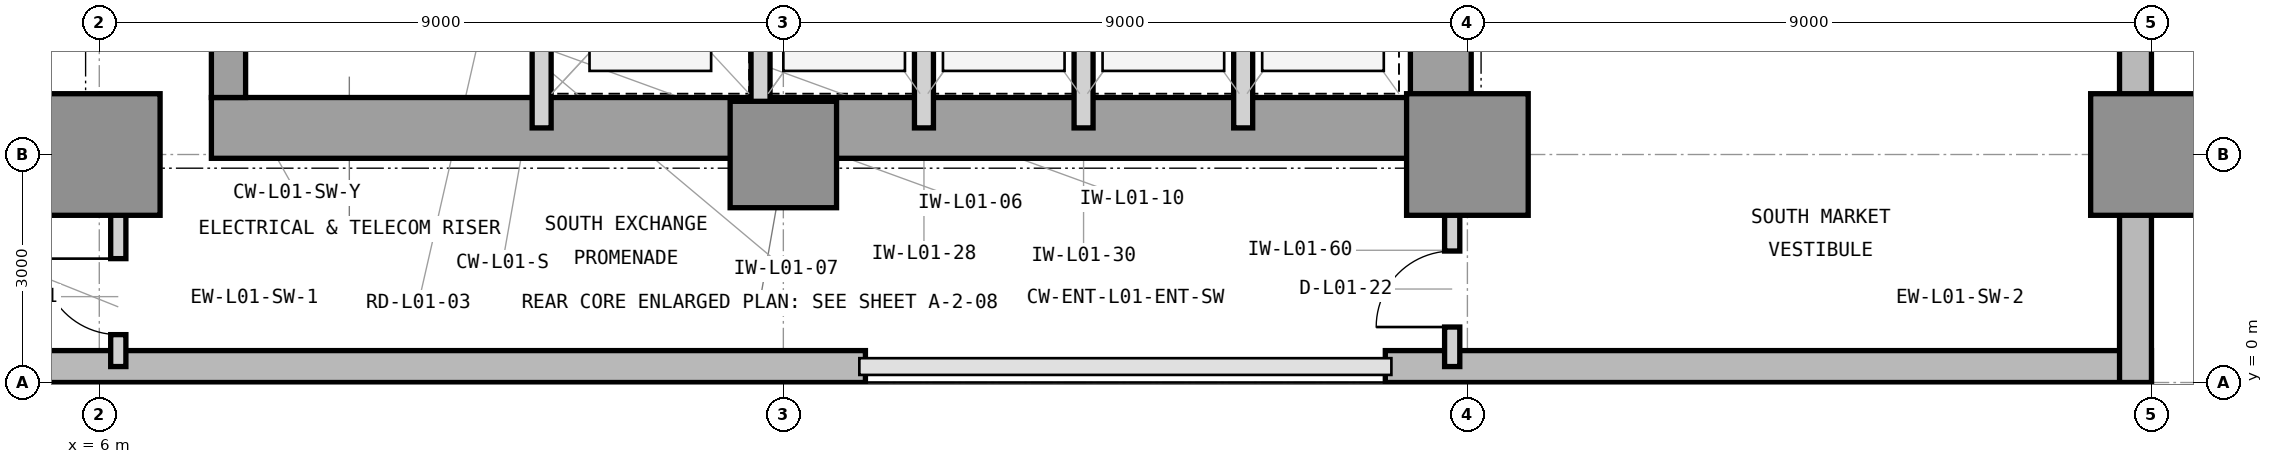
"""IFC4 building model, lengths in metres.
Left out: names, types, materials, properties, quantities, classifications, styles, units other than length and angle.
Written with IfcOpenShell. Run it as: python <this file> out.ifc"""

import sys

from ifc_helpers import new_model, si_unit, direction, frame, frame_2d, origin, origin_2d, place, context, subcontext, project, spatial, rectangle, extrude, element, fill, save


model = new_model("IFC4")
c1 = context("Model", 3, precision=1e-05, world=origin(), true_north=direction((0.0, 1.0)))
c2 = subcontext(c1, "Body", "Model", "MODEL_VIEW")
j1 = project(units=[si_unit("LENGTHUNIT", "METRE"), si_unit("PLANEANGLEUNIT", "RADIAN")], contexts=[c1])
p1 = place(None, origin())
s1 = spatial("IfcSite", under=j1, at=p1, CompositionType="ELEMENT")
p2 = place(p1, origin())
s2 = spatial("IfcBuilding", under=s1, at=p2, CompositionType="ELEMENT")
p3 = place(p2, frame((0.0, 0.0, 5.4)))
s3 = spatial("IfcBuildingStorey", under=s2, at=p3, CompositionType="ELEMENT", Elevation=5.4)
p4 = place(p3, frame((7.475, 3.35, 0.0), z_axis=(0.0, 0.0, 1.0), x_axis=(1.0, 0.0, 0.0)))
e1 = element("IfcWall", 1, at=p4, inside=s3, PredefinedType="SHEAR", context=c2, shape_type="SweptSolid", body=[
    extrude(rectangle(XDim=16.575, YDim=0.8, at=frame_2d((8.288, 0.0))), origin(), (0.0, 0.0, 1.0), 5.4),
])
p5 = place(p3, frame((23.65, 3.75, 0.0), z_axis=(0.0, 0.0, 1.0), x_axis=(0.0, 1.0, 0.0)))
e2 = element("IfcWall", 2, at=p5, inside=s3, PredefinedType="SHEAR", context=c2, shape_type="SweptSolid", body=[
    extrude(rectangle(XDim=3.05, YDim=0.8, at=frame_2d((1.525, 0.0))), origin(), (0.0, 0.0, 1.0), 5.4),
])
p6 = place(p3, frame((7.7, 3.75, 0.0), z_axis=(0.0, 0.0, 1.0), x_axis=(0.0, 1.0, 0.0)))
e3 = element("IfcWall", 3, at=p6, inside=s3, PredefinedType="SHEAR", context=c2, shape_type="SweptSolid", body=[
    extrude(rectangle(XDim=0.675, YDim=0.45, at=frame_2d((0.337, 0.0))), origin(), (0.0, 0.0, 1.0), 5.4),
])
p7 = place(p3, frame((6.0, 3.0, 0.0), z_axis=(0.0, 0.0, 1.0), x_axis=(1.0, 0.0, 0.0)))
e4 = element("IfcColumn", 4, at=p7, inside=s3, PredefinedType="COLUMN", context=c2, shape_type="SweptSolid", body=[
    extrude(rectangle(XDim=1.6, YDim=1.6, at=origin_2d()), origin(), (0.0, 0.0, 1.0), 5.4),
])
p8 = place(p3, frame((15.0, 3.0, 0.0), z_axis=(0.0, 0.0, 1.0), x_axis=(1.0, 0.0, 0.0)))
e5 = element("IfcColumn", 5, at=p8, inside=s3, PredefinedType="COLUMN", context=c2, shape_type="SweptSolid", body=[
    extrude(rectangle(XDim=1.4, YDim=1.4, at=origin_2d()), origin(), (0.0, 0.0, 1.0), 5.4),
])
for number, where, z_axis, x_axis in (
    (6, (24.0, 3.0, 0.0), (0.0, 0.0, 1.0), (1.0, 0.0, 0.0)),
    (7, (33.0, 3.0, 0.0), (0.0, 0.0, 1.0), (1.0, 0.0, 0.0)),
):
    element("IfcColumn", number, at=place(p3, frame(where, z_axis=z_axis, x_axis=x_axis)), inside=s3, PredefinedType="COLUMN", context=c2, shape_type="SweptSolid", body=[
        extrude(rectangle(XDim=1.6, YDim=1.6, at=origin_2d()), origin(), (0.0, 0.0, 1.0), 5.4),
    ])
p9 = place(p3, frame((0.0, 0.21, 0.0), z_axis=(0.0, 0.0, 1.0), x_axis=(1.0, 0.0, 0.0)))
e8 = element("IfcWall", 8, at=p9, inside=s3, PredefinedType="STANDARD", context=c2, shape_type="SweptSolid", body=[
    extrude(rectangle(XDim=16.08, YDim=0.42, at=frame_2d((8.04, 0.0))), origin(), (0.0, 0.0, 1.0), 5.1),
])
p10 = place(p3, frame((22.92, 0.21, 0.0), z_axis=(0.0, 0.0, 1.0), x_axis=(1.0, 0.0, 0.0)))
e9 = element("IfcWall", 9, at=p10, inside=s3, PredefinedType="STANDARD", context=c2, shape_type="SweptSolid", body=[
    extrude(rectangle(XDim=10.08, YDim=0.42, at=frame_2d((5.04, 0.0))), origin(), (0.0, 0.0, 1.0), 5.1),
])
p11 = place(p3, frame((32.79, 12.4, 0.0), z_axis=(0.0, 0.0, 1.0), x_axis=(0.0, -1.0, 0.0)))
e10 = element("IfcWall", 10, at=p11, inside=s3, PredefinedType="STANDARD", context=c2, shape_type="SweptSolid", body=[
    extrude(rectangle(XDim=12.4, YDim=0.42, at=frame_2d((6.2, 0.0))), origin(), (0.0, 0.0, 1.0), 5.1),
])
p12 = place(p11, frame((1.5, 0.0, 0.9)))
e11 = element("IfcOpeningElement", 11, at=p12, cuts=e10, PredefinedType="OPENING", context=c2, shape_type="SweptSolid", body=[
    extrude(rectangle(XDim=3.2, YDim=3.1, at=frame_2d((1.6, 1.55))), frame((0.0, 0.22, 0.0), z_axis=(0.0, -1.0, 0.0), x_axis=(1.0, 0.0, 0.0)), (0.0, 0.0, 1.0), 0.44),
])
for number, where, z_axis, x_axis in (
    (12, (11.82, 3.35, 0.0), (0.0, 0.0, 1.0), (0.0, 1.0, 0.0)),
    (13, (14.7, 3.35, 0.0), (0.0, 0.0, 1.0), (0.0, 1.0, 0.0)),
    (14, (16.85, 3.35, 0.0), (0.0, 0.0, 1.0), (0.0, 1.0, 0.0)),
    (15, (18.95, 3.35, 0.0), (0.0, 0.0, 1.0), (0.0, 1.0, 0.0)),
    (16, (21.05, 3.35, 0.0), (0.0, 0.0, 1.0), (0.0, 1.0, 0.0)),
):
    element("IfcWall", number, at=place(p3, frame(where, z_axis=z_axis, x_axis=x_axis)), inside=s3, PredefinedType="PARTITIONING", context=c2, shape_type="SweptSolid", body=[
        extrude(rectangle(XDim=3.35, YDim=0.25, at=frame_2d((1.675, 0.0))), origin(), (0.0, 0.0, 1.0), 5.09),
    ])
p13 = place(p3, frame((6.25, 0.21, 0.0), z_axis=(0.0, 0.0, 1.0), x_axis=(0.0, 1.0, 0.0)))
e17 = element("IfcWall", 17, at=p13, inside=s3, PredefinedType="PARTITIONING", context=c2, shape_type="SweptSolid", body=[
    extrude(rectangle(XDim=3.14, YDim=0.2, at=frame_2d((1.57, 0.0))), origin(), (0.0, 0.0, 1.0), 5.09),
])
p14 = place(p13, frame((0.42, 0.0, 0.0)))
e18 = element("IfcOpeningElement", 18, at=p14, cuts=e17, PredefinedType="OPENING", context=c2, shape_type="SweptSolid", body=[
    extrude(rectangle(XDim=1.0, YDim=2.15, at=frame_2d((0.5, 1.075))), frame((0.0, 0.11, 0.0), z_axis=(0.0, -1.0, 0.0), x_axis=(1.0, 0.0, 0.0)), (0.0, 0.0, 1.0), 0.22),
])
p15 = place(p3, frame((23.8, 0.21, 0.0), z_axis=(0.0, 0.0, 1.0), x_axis=(0.0, 1.0, 0.0)))
e19 = element("IfcWall", 19, at=p15, inside=s3, PredefinedType="PARTITIONING", context=c2, shape_type="SweptSolid", body=[
    extrude(rectangle(XDim=2.04, YDim=0.2, at=frame_2d((1.02, 0.0))), origin(), (0.0, 0.0, 1.0), 5.09),
])
p16 = place(p15, frame((0.52, 0.0, 0.0)))
e20 = element("IfcOpeningElement", 20, at=p16, cuts=e19, PredefinedType="OPENING", context=c2, shape_type="SweptSolid", body=[
    extrude(rectangle(XDim=1.0, YDim=2.15, at=frame_2d((0.5, 1.075))), frame((0.0, 0.11, 0.0), z_axis=(0.0, -1.0, 0.0), x_axis=(1.0, 0.0, 0.0)), (0.0, 0.0, 1.0), 0.22),
])
p17 = place(p14, origin())
e21 = element("IfcDoor", 21, at=p17, inside=s3, OperationType="SINGLE_SWING_RIGHT", PredefinedType="DOOR", context=c2, shape_type="SweptSolid", body=[
    extrude(rectangle(XDim=1.0, YDim=2.15, at=frame_2d((0.5, 1.075))), frame((0.0, 0.025, 0.0), z_axis=(0.0, -1.0, 0.0), x_axis=(1.0, 0.0, 0.0)), (0.0, 0.0, 1.0), 0.05),
])
fill(e18, e21)
p18 = place(p16, origin())
e22 = element("IfcDoor", 22, at=p18, inside=s3, OperationType="SINGLE_SWING_LEFT", PredefinedType="DOOR", context=c2, shape_type="SweptSolid", body=[
    extrude(rectangle(XDim=1.0, YDim=2.15, at=frame_2d((0.5, 1.075))), frame((0.0, 0.025, 0.0), z_axis=(0.0, -1.0, 0.0), x_axis=(1.0, 0.0, 0.0)), (0.0, 0.0, 1.0), 0.05),
])
fill(e20, e22)
save(model, sys.argv[1])
